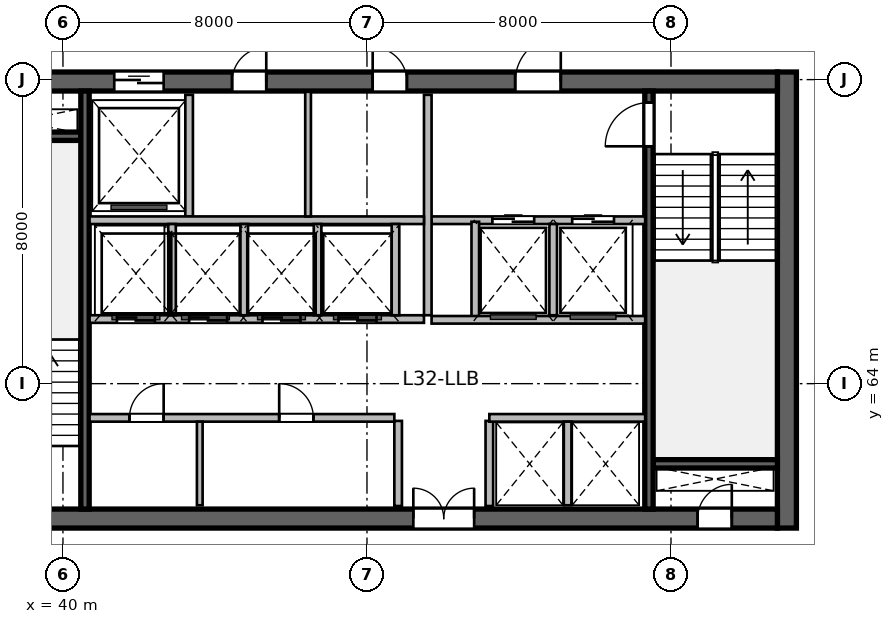
"""IFC4 building model, lengths in metres.
Left out: names, types, materials, properties, quantities, classifications, styles, units other than length and angle.
Written with IfcOpenShell. Run it as: python <this file> out.ifc"""

import sys

from ifc_helpers import new_model, si_unit, direction, frame, frame_2d, origin, place, context, subcontext, project, spatial, rectangle, extrude, source, transform, mapped, element, fill, save


model = new_model("IFC4")
c1 = context("Model", 3, precision=1e-05, world=origin(), true_north=direction((0.0, 1.0)))
c2 = subcontext(c1, "Body", "Model", "MODEL_VIEW")
j1 = project(units=[si_unit("LENGTHUNIT", "METRE"), si_unit("PLANEANGLEUNIT", "RADIAN")], contexts=[c1])
p1 = place(None, origin())
s1 = spatial("IfcSite", under=j1, at=p1, CompositionType="ELEMENT")
p2 = place(p1, origin())
s2 = spatial("IfcBuilding", under=s1, at=p2, CompositionType="ELEMENT")
p3 = place(p2, frame((0.0, 0.0, 135.0)))
s3 = spatial("IfcBuildingStorey", under=s2, at=p3, CompositionType="ELEMENT", Elevation=135.0)
m1 = source(origin(), c2, "Body", "SweptSolid", [
    extrude(rectangle(XDim=12.0, YDim=0.5, at=frame_2d((6.0, 0.0))), origin(), (0.0, 0.0, 1.0), 3.9),
])
p4 = place(p3, frame((59.05, 60.2, 0.0), z_axis=(0.0, 0.0, 1.0), x_axis=(0.0, 1.0, 0.0)))
e1 = element("IfcWall", 1, at=p4, inside=s3, PredefinedType="SHEAR", context=c2, shape_type="MappedRepresentation", body=[
    mapped(m1, transform((0.0, 0.0, 0.0), scale=1.0)),
])
m2 = source(origin(), c2, "Body", "SweptSolid", [
    extrude(rectangle(XDim=21.6, YDim=0.5, at=frame_2d((10.8, 0.0))), origin(), (0.0, 0.0, 1.0), 3.9),
])
p5 = place(p3, frame((37.2, 60.45, 0.0), z_axis=(0.0, 0.0, 1.0), x_axis=(1.0, 0.0, 0.0)))
e2 = element("IfcWall", 2, at=p5, inside=s3, PredefinedType="SHEAR", context=c2, shape_type="MappedRepresentation", body=[
    mapped(m2, transform((0.0, 0.0, 0.0), scale=1.0)),
])
p6 = place(p5, frame((1.1, 0.0, 0.0)))
e3 = element("IfcOpeningElement", 3, at=p6, cuts=e2, PredefinedType="OPENING", context=c2, shape_type="SweptSolid", body=[
    extrude(rectangle(XDim=1.15, YDim=2.15, at=frame_2d((0.575, 1.075))), frame((0.0, 0.26, 0.0), z_axis=(0.0, -1.0, 0.0), x_axis=(1.0, 0.0, 0.0)), (0.0, 0.0, 1.0), 0.52),
])
p7 = place(p5, frame((19.5, 0.0, 0.0)))
e4 = element("IfcOpeningElement", 4, at=p7, cuts=e2, PredefinedType="OPENING", context=c2, shape_type="SweptSolid", body=[
    extrude(rectangle(XDim=0.9, YDim=2.1, at=frame_2d((0.45, 1.05))), frame((0.0, 0.26, 0.0), z_axis=(0.0, -1.0, 0.0), x_axis=(1.0, 0.0, 0.0)), (0.0, 0.0, 1.0), 0.52),
])
p8 = place(p5, frame((12.02, 0.0, 0.0)))
e5 = element("IfcOpeningElement", 5, at=p8, cuts=e2, PredefinedType="OPENING", context=c2, shape_type="SweptSolid", body=[
    extrude(rectangle(XDim=1.6, YDim=2.15, at=frame_2d((0.8, 1.075))), frame((0.0, 0.26, 0.0), z_axis=(0.0, -1.0, 0.0), x_axis=(1.0, 0.0, 0.0)), (0.0, 0.0, 1.0), 0.52),
])
p9 = place(p3, frame((37.2, 71.95, 0.0), z_axis=(0.0, 0.0, 1.0), x_axis=(1.0, 0.0, 0.0)))
e6 = element("IfcWall", 6, at=p9, inside=s3, PredefinedType="SHEAR", context=c2, shape_type="MappedRepresentation", body=[
    mapped(m2, transform((0.0, 0.0, 0.0), scale=1.0)),
])
p10 = place(p9, frame((1.2, 0.0, 0.0)))
e7 = element("IfcOpeningElement", 7, at=p10, cuts=e6, PredefinedType="OPENING", context=c2, shape_type="SweptSolid", body=[
    extrude(rectangle(XDim=0.9, YDim=2.1, at=frame_2d((0.45, 1.05))), frame((0.0, 0.26, 0.0), z_axis=(0.0, -1.0, 0.0), x_axis=(1.0, 0.0, 0.0)), (0.0, 0.0, 1.0), 0.52),
])
p11 = place(p9, frame((14.7, 0.0, 0.0)))
e8 = element("IfcOpeningElement", 8, at=p11, cuts=e6, PredefinedType="OPENING", context=c2, shape_type="SweptSolid", body=[
    extrude(rectangle(XDim=1.2, YDim=2.15, at=frame_2d((0.6, 1.075))), frame((0.0, 0.26, 0.0), z_axis=(0.0, -1.0, 0.0), x_axis=(1.0, 0.0, 0.0)), (0.0, 0.0, 1.0), 0.52),
])
p12 = place(p9, frame((4.15, 0.0, 0.0)))
e9 = element("IfcOpeningElement", 9, at=p12, cuts=e6, PredefinedType="OPENING", context=c2, shape_type="SweptSolid", body=[
    extrude(rectangle(XDim=1.3, YDim=2.15, at=frame_2d((0.65, 1.075))), frame((0.0, 0.26, 0.0), z_axis=(0.0, -1.0, 0.0), x_axis=(1.0, 0.0, 0.0)), (0.0, 0.0, 1.0), 0.52),
])
p13 = place(p9, frame((7.25, 0.0, 0.0)))
e10 = element("IfcOpeningElement", 10, at=p13, cuts=e6, PredefinedType="OPENING", context=c2, shape_type="SweptSolid", body=[
    extrude(rectangle(XDim=0.9, YDim=2.1, at=frame_2d((0.45, 1.05))), frame((0.0, 0.26, 0.0), z_axis=(0.0, -1.0, 0.0), x_axis=(1.0, 0.0, 0.0)), (0.0, 0.0, 1.0), 0.52),
])
p14 = place(p9, frame((10.95, 0.0, 0.0)))
e11 = element("IfcOpeningElement", 11, at=p14, cuts=e6, PredefinedType="OPENING", context=c2, shape_type="SweptSolid", body=[
    extrude(rectangle(XDim=0.9, YDim=2.1, at=frame_2d((0.45, 1.05))), frame((0.0, 0.26, 0.0), z_axis=(0.0, -1.0, 0.0), x_axis=(1.0, 0.0, 0.0)), (0.0, 0.0, 1.0), 0.52),
])
m3 = source(origin(), c2, "Body", "SweptSolid", [
    extrude(rectangle(XDim=3.27, YDim=0.22, at=frame_2d((1.635, 0.0))), origin(), (0.0, 0.0, 1.0), 3.9),
])
for number, where, z_axis, x_axis in (
    (12, (37.2, 70.51, 0.0), (0.0, 0.0, 1.0), (1.0, 0.0, 0.0)),
    (13, (55.53, 61.89, 0.0), (0.0, 0.0, 1.0), (1.0, 0.0, 0.0)),
):
    element("IfcWall", number, at=place(p3, frame(where, z_axis=z_axis, x_axis=x_axis)), inside=s3, PredefinedType="SHEAR", context=c2, shape_type="MappedRepresentation", body=[
        mapped(m3, transform((0.0, 0.0, 0.0), scale=1.0)),
    ])
m4 = source(origin(), c2, "Body", "SweptSolid", [
    extrude(rectangle(XDim=11.0, YDim=0.22, at=frame_2d((5.5, 0.0))), origin(), (0.0, 0.0, 1.0), 3.9),
])
p15 = place(p3, frame((40.58, 60.7, 0.0), z_axis=(0.0, 0.0, 1.0), x_axis=(0.0, 1.0, 0.0)))
e14 = element("IfcWall", 14, at=p15, inside=s3, PredefinedType="SHEAR", context=c2, shape_type="MappedRepresentation", body=[
    mapped(m4, transform((0.0, 0.0, 0.0), scale=1.0)),
])
p16 = place(p3, frame((55.42, 60.7, 0.0), z_axis=(0.0, 0.0, 1.0), x_axis=(0.0, 1.0, 0.0)))
e15 = element("IfcWall", 15, at=p16, inside=s3, PredefinedType="SHEAR", context=c2, shape_type="MappedRepresentation", body=[
    mapped(m4, transform((0.0, 0.0, 0.0), scale=1.0)),
])
p17 = place(p16, frame((9.545, 0.0, 0.0)))
e16 = element("IfcOpeningElement", 16, at=p17, cuts=e15, PredefinedType="OPENING", context=c2, shape_type="SweptSolid", body=[
    extrude(rectangle(XDim=1.15, YDim=2.15, at=frame_2d((0.575, 1.075))), frame((0.0, 0.12, 0.0), z_axis=(0.0, -1.0, 0.0), x_axis=(1.0, 0.0, 0.0)), (0.0, 0.0, 1.0), 0.24),
])
m5 = source(origin(), c2, "Body", "SweptSolid", [
    extrude(rectangle(XDim=2.24, YDim=0.2, at=frame_2d((1.12, 0.0))), origin(), (0.0, 0.0, 1.0), 3.65),
])
for number, where, z_axis, x_axis in (
    (17, (48.82, 60.78, 0.0), (0.0, 0.0, 1.0), (0.0, 1.0, 0.0)),
    (18, (51.22, 60.78, 0.0), (0.0, 0.0, 1.0), (0.0, 1.0, 0.0)),
):
    element("IfcWall", number, at=place(p3, frame(where, z_axis=z_axis, x_axis=x_axis)), inside=s3, PredefinedType="SOLIDWALL", context=c2, shape_type="MappedRepresentation", body=[
        mapped(m5, transform((0.0, 0.0, 0.0), scale=1.0)),
    ])
m6 = source(origin(), c2, "Body", "SweptSolid", [
    extrude(rectangle(XDim=5.62, YDim=0.2, at=frame_2d((2.81, 0.0))), origin(), (0.0, 0.0, 1.0), 3.65),
])
p18 = place(p3, frame((49.7, 68.3, 0.0), z_axis=(0.0, 0.0, 1.0), x_axis=(1.0, 0.0, 0.0)))
e19 = element("IfcWall", 19, at=p18, inside=s3, PredefinedType="SOLIDWALL", context=c2, shape_type="MappedRepresentation", body=[
    mapped(m6, transform((0.0, 0.0, 0.0), scale=1.0)),
])
p19 = place(p18, frame((1.6, 0.0, 0.0)))
e20 = element("IfcOpeningElement", 20, at=p19, cuts=e19, PredefinedType="OPENING", context=c2, shape_type="SweptSolid", body=[
    extrude(rectangle(XDim=1.1, YDim=2.15, at=frame_2d((0.55, 1.075))), frame((0.0, 0.11, 0.0), z_axis=(0.0, -1.0, 0.0), x_axis=(1.0, 0.0, 0.0)), (0.0, 0.0, 1.0), 0.22),
])
p20 = place(p18, frame((3.7, 0.0, 0.0)))
e21 = element("IfcOpeningElement", 21, at=p20, cuts=e19, PredefinedType="OPENING", context=c2, shape_type="SweptSolid", body=[
    extrude(rectangle(XDim=1.1, YDim=2.15, at=frame_2d((0.55, 1.075))), frame((0.0, 0.11, 0.0), z_axis=(0.0, -1.0, 0.0), x_axis=(1.0, 0.0, 0.0)), (0.0, 0.0, 1.0), 0.22),
])
m7 = source(origin(), c2, "Body", "SweptSolid", [
    extrude(rectangle(XDim=5.8, YDim=0.2, at=frame_2d((2.9, 0.0))), origin(), (0.0, 0.0, 1.0), 3.65),
])
p21 = place(p3, frame((49.6, 65.8, 0.0), z_axis=(0.0, 0.0, 1.0), x_axis=(0.0, 1.0, 0.0)))
e22 = element("IfcWall", 22, at=p21, inside=s3, PredefinedType="SOLIDWALL", context=c2, shape_type="MappedRepresentation", body=[
    mapped(m7, transform((0.0, 0.0, 0.0), scale=1.0)),
])
m8 = source(origin(), c2, "Body", "SweptSolid", [
    extrude(rectangle(XDim=2.58, YDim=0.2, at=frame_2d((1.29, 0.0))), origin(), (0.0, 0.0, 1.0), 3.65),
])
p22 = place(p3, frame((50.85, 65.68, 0.0), z_axis=(0.0, 0.0, 1.0), x_axis=(0.0, 1.0, 0.0)))
e23 = element("IfcWall", 23, at=p22, inside=s3, PredefinedType="SOLIDWALL", context=c2, shape_type="MappedRepresentation", body=[
    mapped(m8, transform((0.0, 0.0, 0.0), scale=1.0)),
])
m9 = source(origin(), c2, "Body", "SweptSolid", [
    extrude(rectangle(XDim=2.4, YDim=0.2, at=frame_2d((1.2, 0.0))), origin(), (0.0, 0.0, 1.0), 3.65),
])
p23 = place(p3, frame((52.9, 65.8, 0.0), z_axis=(0.0, 0.0, 1.0), x_axis=(0.0, 1.0, 0.0)))
e24 = element("IfcWall", 24, at=p23, inside=s3, PredefinedType="SOLIDWALL", context=c2, shape_type="MappedRepresentation", body=[
    mapped(m9, transform((0.0, 0.0, 0.0), scale=1.0)),
])
p24 = place(p3, frame((49.7, 65.68, 0.0), z_axis=(0.0, 0.0, 1.0), x_axis=(1.0, 0.0, 0.0)))
e25 = element("IfcWall", 25, at=p24, inside=s3, PredefinedType="SOLIDWALL", context=c2, shape_type="MappedRepresentation", body=[
    mapped(m6, transform((0.0, 0.0, 0.0), scale=1.0)),
])
m10 = source(origin(), c2, "Body", "SweptSolid", [
    extrude(rectangle(XDim=3.2, YDim=0.2, at=frame_2d((1.6, 0.0))), origin(), (0.0, 0.0, 1.0), 3.65),
])
p25 = place(p3, frame((43.32, 68.4, 0.0), z_axis=(0.0, 0.0, 1.0), x_axis=(0.0, 1.0, 0.0)))
e26 = element("IfcWall", 26, at=p25, inside=s3, PredefinedType="SOLIDWALL", context=c2, shape_type="MappedRepresentation", body=[
    mapped(m10, transform((0.0, 0.0, 0.0), scale=1.0)),
])
m11 = source(origin(), c2, "Body", "SweptSolid", [
    extrude(rectangle(XDim=8.8, YDim=0.2, at=frame_2d((4.4, 0.0))), origin(), (0.0, 0.0, 1.0), 3.65),
])
p26 = place(p3, frame((40.7, 68.3, 0.0), z_axis=(0.0, 0.0, 1.0), x_axis=(1.0, 0.0, 0.0)))
e27 = element("IfcWall", 27, at=p26, inside=s3, PredefinedType="SOLIDWALL", context=c2, shape_type="MappedRepresentation", body=[
    mapped(m11, transform((0.0, 0.0, 0.0), scale=1.0)),
])
m12 = source(origin(), c2, "Body", "SweptSolid", [
    extrude(rectangle(XDim=3.28, YDim=0.15, at=frame_2d((1.64, 0.0))), origin(), (0.0, 0.0, 1.0), 3.65),
])
p27 = place(p3, frame((46.45, 68.4, 0.0), z_axis=(0.0, 0.0, 1.0), x_axis=(0.0, 1.0, 0.0)))
e28 = element("IfcWall", 28, at=p27, inside=s3, PredefinedType="PARTITIONING", context=c2, shape_type="MappedRepresentation", body=[
    mapped(m12, transform((0.0, 0.0, 0.0), scale=1.0)),
])
m13 = source(origin(), c2, "Body", "SweptSolid", [
    extrude(rectangle(XDim=8.02, YDim=0.2, at=frame_2d((4.01, 0.0))), origin(), (0.0, 0.0, 1.0), 3.65),
])
p28 = place(p3, frame((40.7, 63.1, 0.0), z_axis=(0.0, 0.0, 1.0), x_axis=(1.0, 0.0, 0.0)))
e29 = element("IfcWall", 29, at=p28, inside=s3, PredefinedType="SOLIDWALL", context=c2, shape_type="MappedRepresentation", body=[
    mapped(m13, transform((0.0, 0.0, 0.0), scale=1.0)),
])
p29 = place(p28, frame((1.05, 0.0, 0.0)))
e30 = element("IfcOpeningElement", 30, at=p29, cuts=e29, PredefinedType="OPENING", context=c2, shape_type="SweptSolid", body=[
    extrude(rectangle(XDim=0.9, YDim=2.1, at=frame_2d((0.45, 1.05))), frame((0.0, 0.11, 0.0), z_axis=(0.0, -1.0, 0.0), x_axis=(1.0, 0.0, 0.0)), (0.0, 0.0, 1.0), 0.22),
])
p30 = place(p28, frame((4.99, 0.0, 0.0)))
e31 = element("IfcOpeningElement", 31, at=p30, cuts=e29, PredefinedType="OPENING", context=c2, shape_type="SweptSolid", body=[
    extrude(rectangle(XDim=0.9, YDim=2.1, at=frame_2d((0.45, 1.05))), frame((0.0, 0.11, 0.0), z_axis=(0.0, -1.0, 0.0), x_axis=(1.0, 0.0, 0.0)), (0.0, 0.0, 1.0), 0.22),
])
m14 = source(origin(), c2, "Body", "SweptSolid", [
    extrude(rectangle(XDim=4.1, YDim=0.2, at=frame_2d((2.05, 0.0))), origin(), (0.0, 0.0, 1.0), 3.65),
])
p31 = place(p3, frame((51.22, 63.1, 0.0), z_axis=(0.0, 0.0, 1.0), x_axis=(1.0, 0.0, 0.0)))
e32 = element("IfcWall", 32, at=p31, inside=s3, PredefinedType="SOLIDWALL", context=c2, shape_type="MappedRepresentation", body=[
    mapped(m14, transform((0.0, 0.0, 0.0), scale=1.0)),
])
m15 = source(origin(), c2, "Body", "SweptSolid", [
    extrude(rectangle(XDim=2.2, YDim=0.15, at=frame_2d((1.1, 0.0))), origin(), (0.0, 0.0, 1.0), 3.65),
])
p32 = place(p3, frame((43.6, 60.8, 0.0), z_axis=(0.0, 0.0, 1.0), x_axis=(0.0, 1.0, 0.0)))
e33 = element("IfcWall", 33, at=p32, inside=s3, PredefinedType="PARTITIONING", context=c2, shape_type="MappedRepresentation", body=[
    mapped(m15, transform((0.0, 0.0, 0.0), scale=1.0)),
])
m16 = source(origin(), c2, "Body", "SweptSolid", [
    extrude(rectangle(XDim=2.2, YDim=0.2, at=frame_2d((1.1, 0.0))), origin(), (0.0, 0.0, 1.0), 3.65),
])
p33 = place(p3, frame((53.28, 60.8, 0.0), z_axis=(0.0, 0.0, 1.0), x_axis=(0.0, 1.0, 0.0)))
e34 = element("IfcWall", 34, at=p33, inside=s3, PredefinedType="SOLIDWALL", context=c2, shape_type="MappedRepresentation", body=[
    mapped(m16, transform((0.0, 0.0, 0.0), scale=1.0)),
])
p34 = place(p3, frame((40.7, 65.7, 0.0), z_axis=(0.0, 0.0, 1.0), x_axis=(1.0, 0.0, 0.0)))
e35 = element("IfcWall", 35, at=p34, inside=s3, PredefinedType="SOLIDWALL", context=c2, shape_type="MappedRepresentation", body=[
    mapped(m11, transform((0.0, 0.0, 0.0), scale=1.0)),
])
p35 = place(p34, frame((0.72, 0.0, 0.0)))
e36 = element("IfcOpeningElement", 36, at=p35, cuts=e35, PredefinedType="OPENING", context=c2, shape_type="SweptSolid", body=[
    extrude(rectangle(XDim=1.0, YDim=2.15, at=frame_2d((0.5, 1.075))), frame((0.0, 0.11, 0.0), z_axis=(0.0, -1.0, 0.0), x_axis=(1.0, 0.0, 0.0)), (0.0, 0.0, 1.0), 0.22),
])
p36 = place(p34, frame((2.62, 0.0, 0.0)))
e37 = element("IfcOpeningElement", 37, at=p36, cuts=e35, PredefinedType="OPENING", context=c2, shape_type="SweptSolid", body=[
    extrude(rectangle(XDim=1.0, YDim=2.15, at=frame_2d((0.5, 1.075))), frame((0.0, 0.11, 0.0), z_axis=(0.0, -1.0, 0.0), x_axis=(1.0, 0.0, 0.0)), (0.0, 0.0, 1.0), 0.22),
])
p37 = place(p34, frame((4.55, 0.0, 0.0)))
e38 = element("IfcOpeningElement", 38, at=p37, cuts=e35, PredefinedType="OPENING", context=c2, shape_type="SweptSolid", body=[
    extrude(rectangle(XDim=1.0, YDim=2.15, at=frame_2d((0.5, 1.075))), frame((0.0, 0.11, 0.0), z_axis=(0.0, -1.0, 0.0), x_axis=(1.0, 0.0, 0.0)), (0.0, 0.0, 1.0), 0.22),
])
p38 = place(p34, frame((6.55, 0.0, 0.0)))
e39 = element("IfcOpeningElement", 39, at=p38, cuts=e35, PredefinedType="OPENING", context=c2, shape_type="SweptSolid", body=[
    extrude(rectangle(XDim=1.0, YDim=2.15, at=frame_2d((0.5, 1.075))), frame((0.0, 0.11, 0.0), z_axis=(0.0, -1.0, 0.0), x_axis=(1.0, 0.0, 0.0)), (0.0, 0.0, 1.0), 0.22),
])
for number, where, z_axis, x_axis in (
    (40, (48.75, 65.8, 0.0), (0.0, 0.0, 1.0), (0.0, 1.0, 0.0)),
    (41, (42.87, 65.8, 0.0), (0.0, 0.0, 1.0), (0.0, 1.0, 0.0)),
    (42, (44.77, 65.8, 0.0), (0.0, 0.0, 1.0), (0.0, 1.0, 0.0)),
    (43, (46.7, 65.8, 0.0), (0.0, 0.0, 1.0), (0.0, 1.0, 0.0)),
):
    element("IfcWall", number, at=place(p3, frame(where, z_axis=z_axis, x_axis=x_axis)), inside=s3, PredefinedType="SOLIDWALL", context=c2, shape_type="MappedRepresentation", body=[
        mapped(m9, transform((0.0, 0.0, 0.0), scale=1.0)),
    ])
m17 = source(origin(), c2, "Body", "SweptSolid", [
    extrude(rectangle(XDim=0.9, YDim=2.1, at=frame_2d((0.45, 1.05))), frame((0.0, 0.025, 0.0), z_axis=(0.0, -1.0, 0.0), x_axis=(1.0, 0.0, 0.0)), (0.0, 0.0, 1.0), 0.05),
])
p39 = place(p7, origin())
e44 = element("IfcDoor", 44, at=p39, inside=s3, OperationType="SINGLE_SWING_RIGHT", PredefinedType="DOOR", context=c2, shape_type="MappedRepresentation", body=[
    mapped(m17, transform((0.0, 0.0, 0.0), scale=1.0)),
])
fill(e4, e44)
m18 = source(origin(), c2, "Body", "SweptSolid", [
    extrude(rectangle(XDim=1.15, YDim=2.15, at=frame_2d((0.575, 1.075))), frame((0.0, 0.025, 0.0), z_axis=(0.0, -1.0, 0.0), x_axis=(1.0, 0.0, 0.0)), (0.0, 0.0, 1.0), 0.05),
])
p40 = place(p17, origin())
e45 = element("IfcDoor", 45, at=p40, inside=s3, OperationType="SINGLE_SWING_LEFT", PredefinedType="DOOR", context=c2, shape_type="MappedRepresentation", body=[
    mapped(m18, transform((0.0, 0.0, 0.0), scale=1.0)),
])
fill(e16, e45)
m19 = source(origin(), c2, "Body", "SweptSolid", [
    extrude(rectangle(XDim=1.6, YDim=2.15, at=frame_2d((0.8, 1.075))), frame((0.0, 0.025, 0.0), z_axis=(0.0, -1.0, 0.0), x_axis=(1.0, 0.0, 0.0)), (0.0, 0.0, 1.0), 0.05),
])
p41 = place(p8, origin())
e46 = element("IfcDoor", 46, at=p41, inside=s3, OperationType="DOUBLE_DOOR_SINGLE_SWING", PredefinedType="DOOR", context=c2, shape_type="MappedRepresentation", body=[
    mapped(m19, transform((0.0, 0.0, 0.0), scale=1.0)),
])
fill(e5, e46)
m20 = source(origin(), c2, "Body", "SweptSolid", [
    extrude(rectangle(XDim=1.2, YDim=2.15, at=frame_2d((0.6, 1.075))), frame((0.0, 0.025, 0.0), z_axis=(0.0, -1.0, 0.0), x_axis=(1.0, 0.0, 0.0)), (0.0, 0.0, 1.0), 0.05),
])
p42 = place(p11, origin())
e47 = element("IfcDoor", 47, at=p42, inside=s3, OperationType="SINGLE_SWING_RIGHT", PredefinedType="DOOR", context=c2, shape_type="MappedRepresentation", body=[
    mapped(m20, transform((0.0, 0.0, 0.0), scale=1.0)),
])
fill(e8, e47)
m21 = source(origin(), c2, "Body", "SweptSolid", [
    extrude(rectangle(XDim=1.1, YDim=2.15, at=frame_2d((0.55, 1.075))), frame((0.0, 0.025, 0.0), z_axis=(0.0, -1.0, 0.0), x_axis=(1.0, 0.0, 0.0)), (0.0, 0.0, 1.0), 0.05),
])
p43 = place(p19, origin())
e48 = element("IfcDoor", 48, at=p43, inside=s3, OperationType="DOUBLE_DOOR_SLIDING", PredefinedType="DOOR", context=c2, shape_type="MappedRepresentation", body=[
    mapped(m21, transform((0.0, 0.0, 0.0), scale=1.0)),
])
fill(e20, e48)
p44 = place(p20, origin())
e49 = element("IfcDoor", 49, at=p44, inside=s3, OperationType="DOUBLE_DOOR_SLIDING", PredefinedType="DOOR", context=c2, shape_type="MappedRepresentation", body=[
    mapped(m21, transform((0.0, 0.0, 0.0), scale=1.0)),
])
fill(e21, e49)
m22 = source(origin(), c2, "Body", "SweptSolid", [
    extrude(rectangle(XDim=1.3, YDim=2.15, at=frame_2d((0.65, 1.075))), frame((0.0, 0.025, 0.0), z_axis=(0.0, -1.0, 0.0), x_axis=(1.0, 0.0, 0.0)), (0.0, 0.0, 1.0), 0.05),
])
p45 = place(p12, origin())
e50 = element("IfcDoor", 50, at=p45, inside=s3, OperationType="DOUBLE_DOOR_SLIDING", PredefinedType="DOOR", context=c2, shape_type="MappedRepresentation", body=[
    mapped(m22, transform((0.0, 0.0, 0.0), scale=1.0)),
])
fill(e9, e50)
p46 = place(p13, origin())
e51 = element("IfcDoor", 51, at=p46, inside=s3, OperationType="SINGLE_SWING_RIGHT", PredefinedType="DOOR", context=c2, shape_type="MappedRepresentation", body=[
    mapped(m17, transform((0.0, 0.0, 0.0), scale=1.0)),
])
fill(e10, e51)
p47 = place(p14, origin())
e52 = element("IfcDoor", 52, at=p47, inside=s3, OperationType="SINGLE_SWING_LEFT", PredefinedType="DOOR", context=c2, shape_type="MappedRepresentation", body=[
    mapped(m17, transform((0.0, 0.0, 0.0), scale=1.0)),
])
fill(e11, e52)
p48 = place(p29, origin())
e53 = element("IfcDoor", 53, at=p48, inside=s3, OperationType="SINGLE_SWING_RIGHT", PredefinedType="DOOR", context=c2, shape_type="MappedRepresentation", body=[
    mapped(m17, transform((0.0, 0.0, 0.0), scale=1.0)),
])
fill(e30, e53)
p49 = place(p30, origin())
e54 = element("IfcDoor", 54, at=p49, inside=s3, OperationType="SINGLE_SWING_LEFT", PredefinedType="DOOR", context=c2, shape_type="MappedRepresentation", body=[
    mapped(m17, transform((0.0, 0.0, 0.0), scale=1.0)),
])
fill(e31, e54)
m23 = source(origin(), c2, "Body", "SweptSolid", [
    extrude(rectangle(XDim=1.0, YDim=2.15, at=frame_2d((0.5, 1.075))), frame((0.0, 0.025, 0.0), z_axis=(0.0, -1.0, 0.0), x_axis=(1.0, 0.0, 0.0)), (0.0, 0.0, 1.0), 0.05),
])
p50 = place(p35, origin())
e55 = element("IfcDoor", 55, at=p50, inside=s3, OperationType="DOUBLE_DOOR_SLIDING", PredefinedType="DOOR", context=c2, shape_type="MappedRepresentation", body=[
    mapped(m23, transform((0.0, 0.0, 0.0), scale=1.0)),
])
fill(e36, e55)
p51 = place(p36, origin())
e56 = element("IfcDoor", 56, at=p51, inside=s3, OperationType="DOUBLE_DOOR_SLIDING", PredefinedType="DOOR", context=c2, shape_type="MappedRepresentation", body=[
    mapped(m23, transform((0.0, 0.0, 0.0), scale=1.0)),
])
fill(e37, e56)
p52 = place(p37, origin())
e57 = element("IfcDoor", 57, at=p52, inside=s3, OperationType="DOUBLE_DOOR_SLIDING", PredefinedType="DOOR", context=c2, shape_type="MappedRepresentation", body=[
    mapped(m23, transform((0.0, 0.0, 0.0), scale=1.0)),
])
fill(e38, e57)
p53 = place(p38, origin())
e58 = element("IfcDoor", 58, at=p53, inside=s3, OperationType="DOUBLE_DOOR_SLIDING", PredefinedType="DOOR", context=c2, shape_type="MappedRepresentation", body=[
    mapped(m23, transform((0.0, 0.0, 0.0), scale=1.0)),
])
fill(e39, e58)
save(model, sys.argv[1])
